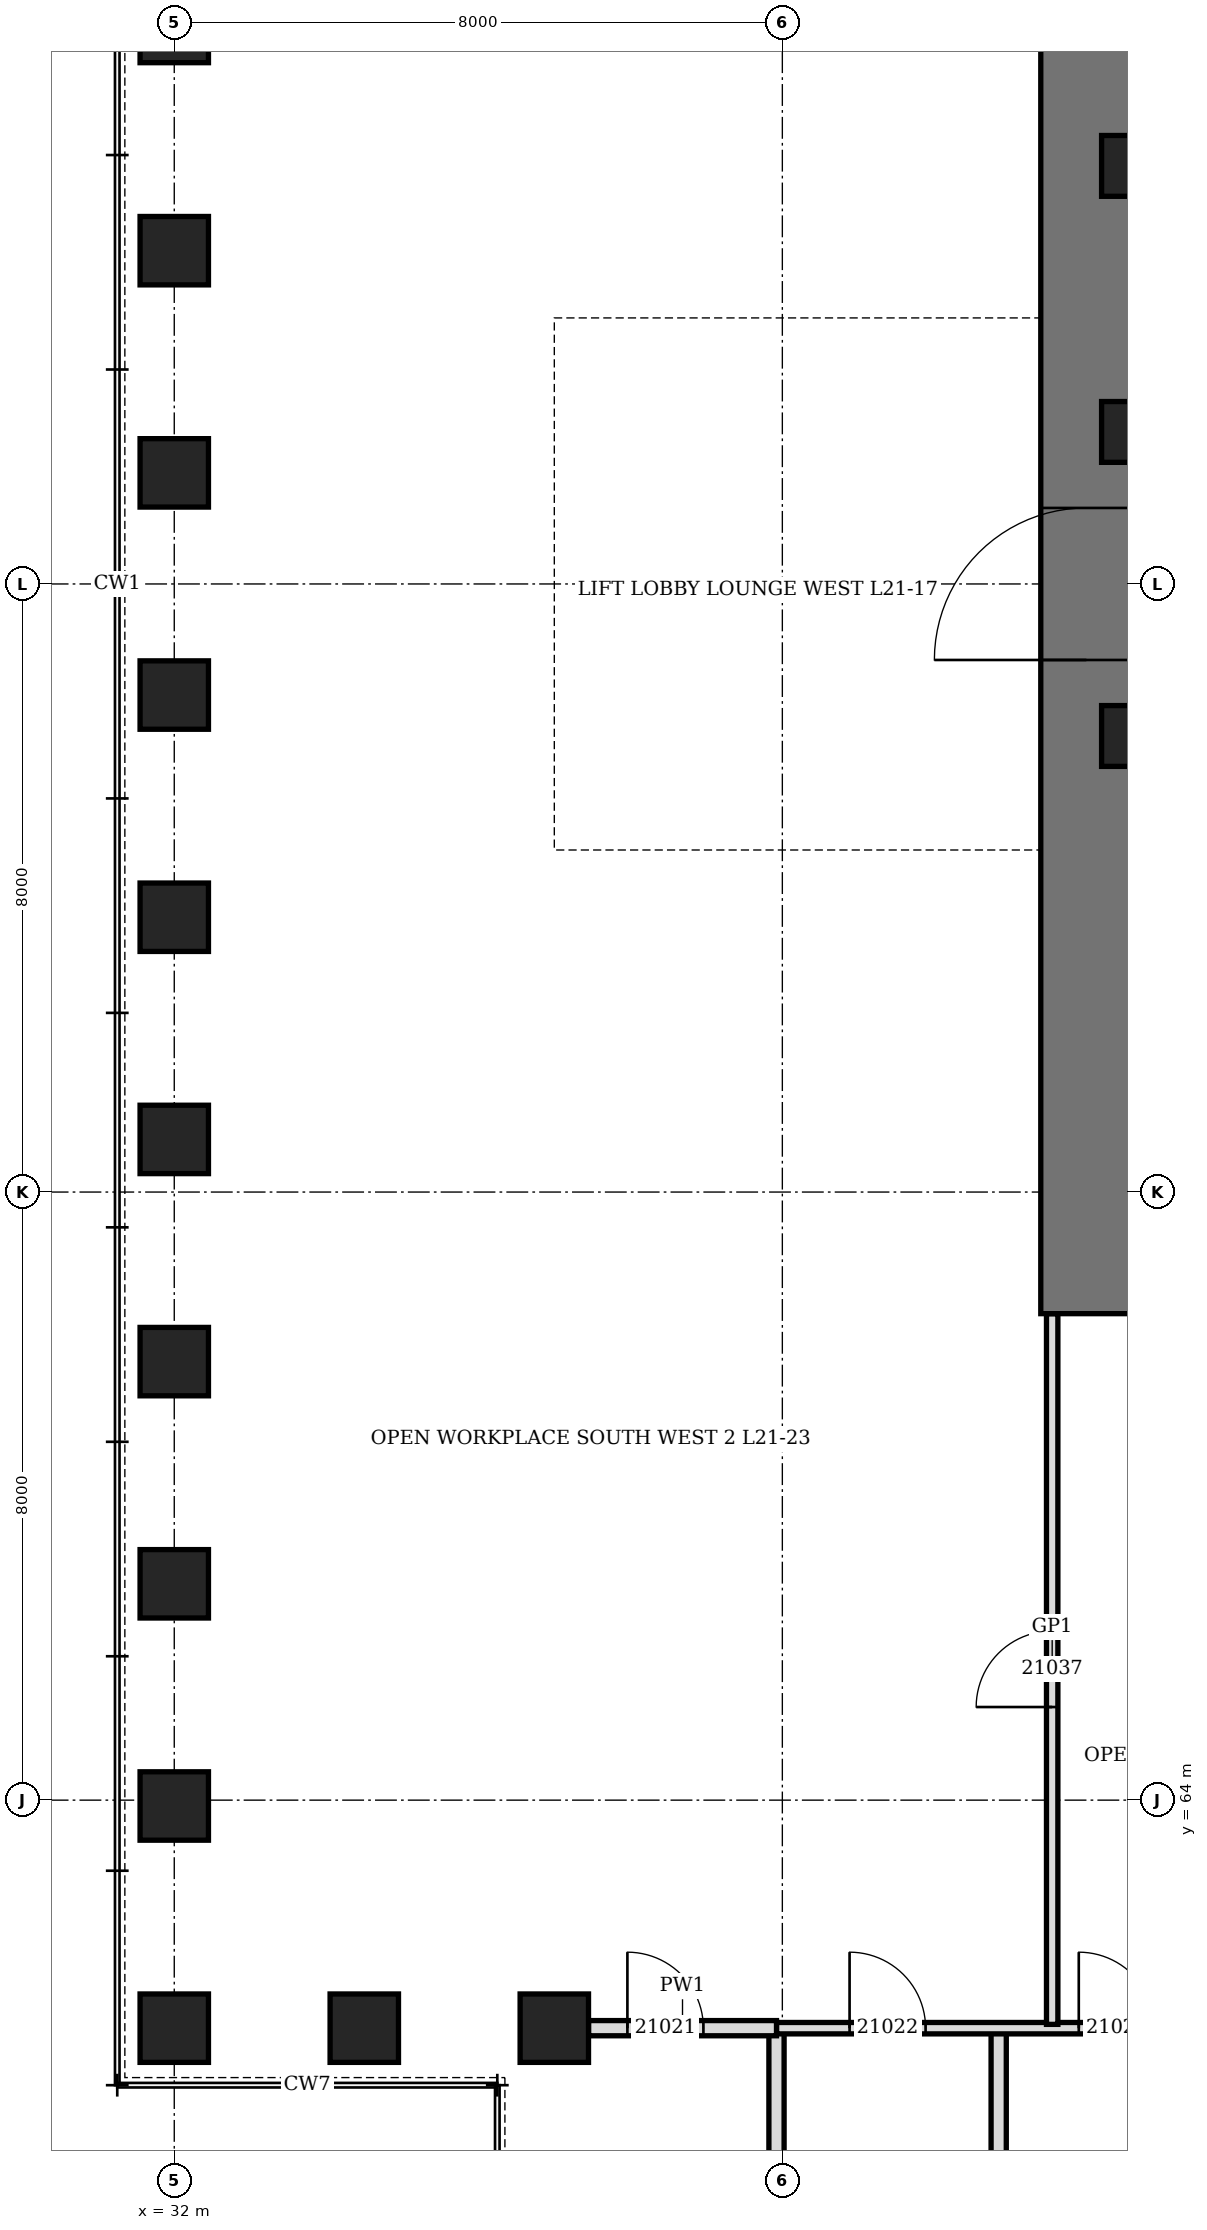
"""IFC4 building model, lengths in metres.
Left out: names, types, materials, properties, quantities, classifications, styles, units other than length and angle.
Written with IfcOpenShell. Run it as: python <this file> out.ifc"""

import sys

from ifc_helpers import new_model, si_unit, direction, frame, frame_2d, origin, origin_2d, place, context, subcontext, project, spatial, rectangle, hollow_rectangle, extrude, element, fill, save


model = new_model("IFC4")
c1 = context("Model", 3, precision=1e-05, world=origin(), true_north=direction((0.0, 1.0)))
c2 = subcontext(c1, "Body", "Model", "MODEL_VIEW")
j1 = project(units=[si_unit("LENGTHUNIT", "METRE"), si_unit("PLANEANGLEUNIT", "RADIAN")], contexts=[c1])
p1 = place(None, origin())
s1 = spatial("IfcSite", under=j1, at=p1, CompositionType="ELEMENT")
p2 = place(p1, origin())
s2 = spatial("IfcBuilding", under=s1, at=p2, CompositionType="ELEMENT")
p3 = place(p2, frame((0.0, 0.0, 97.9)))
s3 = spatial("IfcBuildingStorey", under=s2, at=p3, CompositionType="ELEMENT", Elevation=97.9)
for number, where, z_axis, x_axis in (
    (1, (32.0, 87.308, 0.0), (0.0, 0.0, 1.0), (0.0, 1.0, 0.0)),
    (2, (32.0, 84.385, 0.0), (0.0, 0.0, 1.0), (0.0, 1.0, 0.0)),
    (3, (32.0, 81.461, 0.0), (0.0, 0.0, 1.0), (0.0, 1.0, 0.0)),
    (4, (32.0, 78.539, 0.0), (0.0, 0.0, 1.0), (0.0, 1.0, 0.0)),
    (5, (32.0, 75.615, 0.0), (0.0, 0.0, 1.0), (0.0, 1.0, 0.0)),
    (6, (32.0, 72.692, 0.0), (0.0, 0.0, 1.0), (0.0, 1.0, 0.0)),
    (7, (32.0, 69.769, 0.0), (0.0, 0.0, 1.0), (0.0, 1.0, 0.0)),
    (8, (32.0, 66.846, 0.0), (0.0, 0.0, 1.0), (0.0, 1.0, 0.0)),
    (9, (32.0, 63.923, 0.0), (0.0, 0.0, 1.0), (0.0, 1.0, 0.0)),
    (10, (32.0, 61.0, 0.0), (0.0, 0.0, 1.0), (1.0, 0.0, 0.0)),
    (11, (34.5, 61.0, 0.0), (0.0, 0.0, 1.0), (1.0, 0.0, 0.0)),
    (12, (37.0, 61.0, 0.0), (0.0, 0.0, 1.0), (0.0, 1.0, 0.0)),
):
    element("IfcColumn", number, at=place(p3, frame(where, z_axis=z_axis, x_axis=x_axis)), inside=s3, PredefinedType="COLUMN", context=c2, shape_type="SweptSolid", body=[
        extrude(hollow_rectangle(XDim=0.9, YDim=0.9, WallThickness=0.12, at=origin_2d()), origin(), (0.0, 0.0, 1.0), 4.2),
    ])
p4 = place(p3, frame((44.0, 70.4, 0.0), z_axis=(0.0, 0.0, 1.0), x_axis=(0.0, 1.0, 0.0)))
e13 = element("IfcWall", 13, at=p4, inside=s3, PredefinedType="SHEAR", context=c2, shape_type="SweptSolid", body=[
    extrude(rectangle(XDim=19.2, YDim=1.2, at=frame_2d((9.6, 0.0))), origin(), (0.0, 0.0, 1.0), 4.2),
])
p5 = place(p4, frame((8.6, 0.0, 0.0)))
e14 = element("IfcOpeningElement", 14, at=p5, cuts=e13, PredefinedType="OPENING", context=c2, shape_type="SweptSolid", body=[
    extrude(rectangle(XDim=2.0, YDim=2.4, at=frame_2d((1.0, 1.2))), frame((0.0, 0.61, 0.0), z_axis=(0.0, -1.0, 0.0), x_axis=(1.0, 0.0, 0.0)), (0.0, 0.0, 1.0), 1.22),
])
for number, where, z_axis, x_axis in (
    (15, (44.6, 78.0, 0.0), (0.0, 0.0, 1.0), (1.0, 0.0, 0.0)),
    (16, (44.6, 82.0, 0.0), (0.0, 0.0, 1.0), (1.0, 0.0, 0.0)),
    (17, (44.6, 85.5, 0.0), (0.0, 0.0, 1.0), (1.0, 0.0, 0.0)),
):
    element("IfcColumn", number, at=place(p3, frame(where, z_axis=z_axis, x_axis=x_axis)), inside=s3, PredefinedType="COLUMN", context=c2, shape_type="SweptSolid", body=[
        extrude(hollow_rectangle(XDim=0.8, YDim=0.8, WallThickness=0.1, at=origin_2d()), origin(), (0.0, 0.0, 1.0), 4.2),
    ])
p6 = place(p3, frame((39.923, 56.45, 0.0), z_axis=(0.0, 0.0, 1.0), x_axis=(0.0, 1.0, 0.0)))
e18 = element("IfcWall", 18, at=p6, inside=s3, PredefinedType="PARTITIONING", context=c2, shape_type="SweptSolid", body=[
    extrude(rectangle(XDim=4.55, YDim=0.2, at=frame_2d((2.275, 0.0))), origin(), (0.0, 0.0, 1.0), 3.188),
])
p7 = place(p3, frame((42.846, 56.45, 0.0), z_axis=(0.0, 0.0, 1.0), x_axis=(0.0, 1.0, 0.0)))
e19 = element("IfcWall", 19, at=p7, inside=s3, PredefinedType="PARTITIONING", context=c2, shape_type="SweptSolid", body=[
    extrude(rectangle(XDim=4.55, YDim=0.2, at=frame_2d((2.275, 0.0))), origin(), (0.0, 0.0, 1.0), 1.95),
])
p8 = place(p3, frame((39.923, 61.0, 0.0), z_axis=(0.0, 0.0, 1.0), x_axis=(1.0, 0.0, 0.0)))
e20 = element("IfcWall", 20, at=p8, inside=s3, PredefinedType="PARTITIONING", context=c2, shape_type="SweptSolid", body=[
    extrude(rectangle(XDim=14.715, YDim=0.15, at=frame_2d((7.358, 0.0))), origin(), (0.0, 0.0, 1.0), 3.95),
])
p9 = place(p8, frame((0.961, 0.0, 0.0)))
e21 = element("IfcOpeningElement", 21, at=p9, cuts=e20, PredefinedType="OPENING", context=c2, shape_type="SweptSolid", body=[
    extrude(rectangle(XDim=1.0, YDim=2.1, at=frame_2d((0.5, 1.05))), frame((0.0, 0.085, 0.0), z_axis=(0.0, -1.0, 0.0), x_axis=(1.0, 0.0, 0.0)), (0.0, 0.0, 1.0), 0.17),
])
p10 = place(p8, frame((3.977, 0.0, 0.0)))
e22 = element("IfcOpeningElement", 22, at=p10, cuts=e20, PredefinedType="OPENING", context=c2, shape_type="SweptSolid", body=[
    extrude(rectangle(XDim=1.0, YDim=2.1, at=frame_2d((0.5, 1.05))), frame((0.0, 0.085, 0.0), z_axis=(0.0, -1.0, 0.0), x_axis=(1.0, 0.0, 0.0)), (0.0, 0.0, 1.0), 0.17),
])
p11 = place(p8, frame((6.808, 0.0, 0.0)))
e23 = element("IfcOpeningElement", 23, at=p11, cuts=e20, PredefinedType="OPENING", context=c2, shape_type="SweptSolid", body=[
    extrude(rectangle(XDim=1.0, YDim=2.1, at=frame_2d((0.5, 1.05))), frame((0.0, 0.085, 0.0), z_axis=(0.0, -1.0, 0.0), x_axis=(1.0, 0.0, 0.0)), (0.0, 0.0, 1.0), 0.17),
])
p12 = place(p8, frame((9.731, 0.0, 0.0)))
e24 = element("IfcOpeningElement", 24, at=p12, cuts=e20, PredefinedType="OPENING", context=c2, shape_type="SweptSolid", body=[
    extrude(rectangle(XDim=1.0, YDim=2.1, at=frame_2d((0.5, 1.05))), frame((0.0, 0.085, 0.0), z_axis=(0.0, -1.0, 0.0), x_axis=(1.0, 0.0, 0.0)), (0.0, 0.0, 1.0), 0.17),
])
p13 = place(p8, frame((12.654, 0.0, 0.0)))
e25 = element("IfcOpeningElement", 25, at=p13, cuts=e20, PredefinedType="OPENING", context=c2, shape_type="SweptSolid", body=[
    extrude(rectangle(XDim=1.0, YDim=2.1, at=frame_2d((0.5, 1.05))), frame((0.0, 0.085, 0.0), z_axis=(0.0, -1.0, 0.0), x_axis=(1.0, 0.0, 0.0)), (0.0, 0.0, 1.0), 0.17),
])
p14 = place(p3, frame((37.45, 61.0, 0.0), z_axis=(0.0, 0.0, 1.0), x_axis=(1.0, 0.0, 0.0)))
e26 = element("IfcWall", 26, at=p14, inside=s3, PredefinedType="PARTITIONING", context=c2, shape_type="SweptSolid", body=[
    extrude(rectangle(XDim=2.473, YDim=0.2, at=frame_2d((1.237, 0.0))), origin(), (0.0, 0.0, 1.0), 3.95),
])
p15 = place(p14, frame((0.511, 0.0, 0.0)))
e27 = element("IfcOpeningElement", 27, at=p15, cuts=e26, PredefinedType="OPENING", context=c2, shape_type="SweptSolid", body=[
    extrude(rectangle(XDim=1.0, YDim=2.1, at=frame_2d((0.5, 1.05))), frame((0.0, 0.11, 0.0), z_axis=(0.0, -1.0, 0.0), x_axis=(1.0, 0.0, 0.0)), (0.0, 0.0, 1.0), 0.22),
])
p16 = place(p3, frame((43.55, 61.05, 0.0), z_axis=(0.0, 0.0, 1.0), x_axis=(0.0, 1.0, 0.0)))
e28 = element("IfcWall", 28, at=p16, inside=s3, PredefinedType="PARTITIONING", context=c2, shape_type="SweptSolid", body=[
    extrude(rectangle(XDim=9.35, YDim=0.15, at=frame_2d((4.675, 0.0))), origin(), (0.0, 0.0, 1.0), 3.95),
])
p17 = place(p16, frame((4.175, 0.0, 0.0)))
e29 = element("IfcOpeningElement", 29, at=p17, cuts=e28, PredefinedType="OPENING", context=c2, shape_type="SweptSolid", body=[
    extrude(rectangle(XDim=1.0, YDim=2.4, at=frame_2d((0.5, 1.2))), frame((0.0, 0.085, 0.0), z_axis=(0.0, -1.0, 0.0), x_axis=(1.0, 0.0, 0.0)), (0.0, 0.0, 1.0), 0.17),
])
p18 = place(p5, origin())
e30 = element("IfcDoor", 30, at=p18, inside=s3, OperationType="DOUBLE_DOOR_SINGLE_SWING", PredefinedType="DOOR", context=c2, shape_type="SweptSolid", body=[
    extrude(rectangle(XDim=2.0, YDim=2.4, at=frame_2d((1.0, 1.2))), frame((0.0, 0.35, 0.0), z_axis=(0.0, -1.0, 0.0), x_axis=(1.0, 0.0, 0.0)), (0.0, 0.0, 1.0), 0.7),
])
fill(e14, e30)
p19 = place(p15, origin())
e31 = element("IfcDoor", 31, at=p19, inside=s3, OperationType="SINGLE_SWING_LEFT", PredefinedType="DOOR", context=c2, shape_type="SweptSolid", body=[
    extrude(rectangle(XDim=1.0, YDim=2.1, at=frame_2d((0.5, 1.05))), frame((0.0, 0.1, 0.0), z_axis=(0.0, -1.0, 0.0), x_axis=(1.0, 0.0, 0.0)), (0.0, 0.0, 1.0), 0.199),
])
fill(e27, e31)
p20 = place(p9, origin())
e32 = element("IfcDoor", 32, at=p20, inside=s3, OperationType="SINGLE_SWING_LEFT", PredefinedType="DOOR", context=c2, shape_type="SweptSolid", body=[
    extrude(rectangle(XDim=1.0, YDim=2.1, at=frame_2d((0.5, 1.05))), frame((0.0, 0.075, 0.0), z_axis=(0.0, -1.0, 0.0), x_axis=(1.0, 0.0, 0.0)), (0.0, 0.0, 1.0), 0.149),
])
fill(e21, e32)
p21 = place(p10, origin())
e33 = element("IfcDoor", 33, at=p21, inside=s3, OperationType="SINGLE_SWING_LEFT", PredefinedType="DOOR", context=c2, shape_type="SweptSolid", body=[
    extrude(rectangle(XDim=1.0, YDim=2.1, at=frame_2d((0.5, 1.05))), frame((0.0, 0.075, 0.0), z_axis=(0.0, -1.0, 0.0), x_axis=(1.0, 0.0, 0.0)), (0.0, 0.0, 1.0), 0.149),
])
fill(e22, e33)
p22 = place(p17, origin())
e34 = element("IfcDoor", 34, at=p22, inside=s3, OperationType="SINGLE_SWING_RIGHT", PredefinedType="DOOR", context=c2, shape_type="SweptSolid", body=[
    extrude(rectangle(XDim=1.0, YDim=2.4, at=frame_2d((0.5, 1.2))), frame((0.0, 0.075, 0.0), z_axis=(0.0, -1.0, 0.0), x_axis=(1.0, 0.0, 0.0)), (0.0, 0.0, 1.0), 0.149),
])
fill(e29, e34)
save(model, sys.argv[1])
